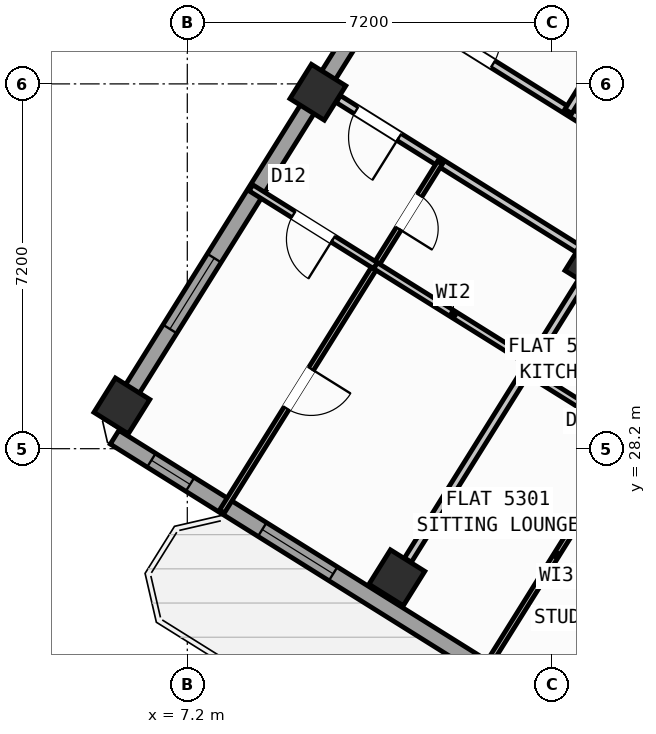
"""IFC4 building model, lengths in metres.
Left out: names, types, materials, properties, quantities, classifications, styles, units other than length and angle.
Written with IfcOpenShell. Run it as: python <this file> out.ifc"""

import sys

from ifc_helpers import new_model, si_unit, direction, frame, frame_2d, origin, origin_2d, place, context, subcontext, project, spatial, rectangle, hollow_rectangle, extrude, source, transform, mapped, element, fill, save


model = new_model("IFC4")
c1 = context("Model", 3, precision=1e-05, world=origin(), true_north=direction((0.0, 1.0)))
c2 = subcontext(c1, "Body", "Model", "MODEL_VIEW")
j1 = project(units=[si_unit("LENGTHUNIT", "METRE"), si_unit("PLANEANGLEUNIT", "RADIAN")], contexts=[c1])
p1 = place(None, origin())
s1 = spatial("IfcSite", under=j1, at=p1, CompositionType="ELEMENT")
p2 = place(p1, origin())
s2 = spatial("IfcBuilding", under=s1, at=p2, CompositionType="ELEMENT")
p3 = place(p2, frame((0.0, 0.0, 211.2)))
s3 = spatial("IfcBuildingStorey", under=s2, at=p3, CompositionType="ELEMENT", Elevation=211.2)
m1 = source(origin(), c2, "Body", "SweptSolid", [
    extrude(hollow_rectangle(XDim=0.8, YDim=0.8, WallThickness=0.032, at=origin_2d()), origin(), (0.0, 0.0, 1.0), 3.6),
])
for number, where, z_axis, x_axis in (
    (1, (15.205, 31.844, 0.0), (0.0, 0.0, 1.0), (-0.848, 0.53, 0.0)),
    (2, (11.336, 25.653, 0.0), (0.0, 0.0, 1.0), (-0.848, 0.53, 0.0)),
    (3, (9.777, 35.235, 0.0), (0.0, 0.0, 1.0), (-0.848, 0.53, 0.0)),
    (4, (5.909, 29.044, 0.0), (0.0, 0.0, 1.0), (-0.848, 0.53, 0.0)),
):
    element("IfcColumn", number, at=place(p3, frame(where, z_axis=z_axis, x_axis=x_axis)), inside=s3, PredefinedType="COLUMN", context=c2, shape_type="MappedRepresentation", body=[
        mapped(m1, transform((0.0, 0.0, 0.0), scale=1.0)),
    ])
p4 = place(p3, frame((31.76, 12.183, 0.0), z_axis=(0.0, 0.0, 1.0), x_axis=(-0.848047074256, 0.529920899612, 0.0)))
e5 = element("IfcWall", 5, at=p4, inside=s3, PredefinedType="STANDARD", context=c2, shape_type="SweptSolid", body=[
    extrude(rectangle(XDim=30.652, YDim=0.32, at=frame_2d((15.326, 0.0))), origin(), (0.0, 0.0, 1.0), 3.35),
])
p5 = place(p4, frame((15.166, 0.0, 0.0)))
e6 = element("IfcOpeningElement", 6, at=p5, cuts=e5, PredefinedType="OPENING", context=c2, shape_type="SweptSolid", body=[
    extrude(rectangle(XDim=1.2, YDim=2.15, at=frame_2d((0.6, 1.075))), frame((0.0, 0.17, 0.0), z_axis=(0.0, -1.0, 0.0), x_axis=(1.0, 0.0, 0.0)), (0.0, 0.0, 1.0), 0.34),
])
p6 = place(p4, frame((2.24, 0.0, 0.9)))
e7 = element("IfcOpeningElement", 7, at=p6, cuts=e5, PredefinedType="OPENING", context=c2, shape_type="SweptSolid", body=[
    extrude(rectangle(XDim=1.65, YDim=1.45, at=frame_2d((0.825, 0.725))), frame((0.0, 0.17, 0.0), z_axis=(0.0, -1.0, 0.0), x_axis=(1.0, 0.0, 0.0)), (0.0, 0.0, 1.0), 0.34),
])
p7 = place(p4, frame((7.469, 0.0, 0.9)))
e8 = element("IfcOpeningElement", 8, at=p7, cuts=e5, PredefinedType="OPENING", context=c2, shape_type="SweptSolid", body=[
    extrude(rectangle(XDim=1.65, YDim=1.45, at=frame_2d((0.825, 0.725))), frame((0.0, 0.17, 0.0), z_axis=(0.0, -1.0, 0.0), x_axis=(1.0, 0.0, 0.0)), (0.0, 0.0, 1.0), 0.34),
])
p8 = place(p4, frame((12.623, 0.0, 1.0)))
e9 = element("IfcOpeningElement", 9, at=p8, cuts=e5, PredefinedType="OPENING", context=c2, shape_type="SweptSolid", body=[
    extrude(rectangle(XDim=0.9, YDim=1.25, at=frame_2d((0.45, 0.625))), frame((0.0, 0.17, 0.0), z_axis=(0.0, -1.0, 0.0), x_axis=(1.0, 0.0, 0.0)), (0.0, 0.0, 1.0), 0.34),
])
p9 = place(p4, frame((19.715, 0.0, 1.0)))
e10 = element("IfcOpeningElement", 10, at=p9, cuts=e5, PredefinedType="OPENING", context=c2, shape_type="SweptSolid", body=[
    extrude(rectangle(XDim=0.9, YDim=1.25, at=frame_2d((0.45, 0.625))), frame((0.0, 0.17, 0.0), z_axis=(0.0, -1.0, 0.0), x_axis=(1.0, 0.0, 0.0)), (0.0, 0.0, 1.0), 0.34),
])
p10 = place(p4, frame((25.566, 0.0, 0.9)))
e11 = element("IfcOpeningElement", 11, at=p10, cuts=e5, PredefinedType="OPENING", context=c2, shape_type="SweptSolid", body=[
    extrude(rectangle(XDim=1.65, YDim=1.45, at=frame_2d((0.825, 0.725))), frame((0.0, 0.17, 0.0), z_axis=(0.0, -1.0, 0.0), x_axis=(1.0, 0.0, 0.0)), (0.0, 0.0, 1.0), 0.34),
])
p11 = place(p4, frame((28.896, 0.0, 1.0)))
e12 = element("IfcOpeningElement", 12, at=p11, cuts=e5, PredefinedType="OPENING", context=c2, shape_type="SweptSolid", body=[
    extrude(rectangle(XDim=0.9, YDim=1.25, at=frame_2d((0.45, 0.625))), frame((0.0, 0.17, 0.0), z_axis=(0.0, -1.0, 0.0), x_axis=(1.0, 0.0, 0.0)), (0.0, 0.0, 1.0), 0.34),
])
p12 = place(p3, frame((5.7, 28.71, 0.0), z_axis=(0.0, 0.0, 1.0), x_axis=(0.529923711467, 0.8480453172, 0.0)))
e13 = element("IfcWall", 13, at=p12, inside=s3, PredefinedType="STANDARD", context=c2, shape_type="SweptSolid", body=[
    extrude(rectangle(XDim=21.587, YDim=0.32, at=frame_2d((10.794, 0.0))), origin(), (0.0, 0.0, 1.0), 2.825),
])
p13 = place(p12, frame((2.184, 0.0, 0.9)))
e14 = element("IfcOpeningElement", 14, at=p13, cuts=e13, PredefinedType="OPENING", context=c2, shape_type="SweptSolid", body=[
    extrude(rectangle(XDim=1.65, YDim=1.45, at=frame_2d((0.825, 0.725))), frame((0.0, 0.17, 0.0), z_axis=(0.0, -1.0, 0.0), x_axis=(1.0, 0.0, 0.0)), (0.0, 0.0, 1.0), 0.34),
])
p14 = place(p12, frame((11.709, 0.0, 0.9)))
e15 = element("IfcOpeningElement", 15, at=p14, cuts=e13, PredefinedType="OPENING", context=c2, shape_type="SweptSolid", body=[
    extrude(rectangle(XDim=1.35, YDim=1.45, at=frame_2d((0.675, 0.725))), frame((0.0, 0.17, 0.0), z_axis=(0.0, -1.0, 0.0), x_axis=(1.0, 0.0, 0.0)), (0.0, 0.0, 1.0), 0.34),
])
p15 = place(p12, frame((17.181, 0.0, 0.95)))
e16 = element("IfcOpeningElement", 16, at=p15, cuts=e13, PredefinedType="OPENING", context=c2, shape_type="SweptSolid", body=[
    extrude(rectangle(XDim=1.95, YDim=1.35, at=frame_2d((0.975, 0.675))), frame((0.0, 0.17, 0.0), z_axis=(0.0, -1.0, 0.0), x_axis=(1.0, 0.0, 0.0)), (0.0, 0.0, 1.0), 0.34),
])
p16 = place(p3, frame((25.065, 28.394, 0.0), z_axis=(0.0, 0.0, 1.0), x_axis=(-0.848048310262, 0.529918921593, 0.0)))
e17 = element("IfcWall", 17, at=p16, inside=s3, PredefinedType="PARTITIONING", context=c2, shape_type="SweptSolid", body=[
    extrude(rectangle(XDim=16.73, YDim=0.16, at=frame_2d((8.365, 0.0))), origin(), (0.0, 0.0, 1.0), 3.34),
])
p17 = place(p16, frame((1.338, 0.0, 0.0)))
e18 = element("IfcOpeningElement", 18, at=p17, cuts=e17, PredefinedType="OPENING", context=c2, shape_type="SweptSolid", body=[
    extrude(rectangle(XDim=1.0, YDim=2.1, at=frame_2d((0.5, 1.05))), frame((0.0, 0.09, 0.0), z_axis=(0.0, -1.0, 0.0), x_axis=(1.0, 0.0, 0.0)), (0.0, 0.0, 1.0), 0.18),
])
p18 = place(p16, frame((5.265, 0.0, 0.0)))
e19 = element("IfcOpeningElement", 19, at=p18, cuts=e17, PredefinedType="OPENING", context=c2, shape_type="SweptSolid", body=[
    extrude(rectangle(XDim=1.0, YDim=2.1, at=frame_2d((0.5, 1.05))), frame((0.0, 0.09, 0.0), z_axis=(0.0, -1.0, 0.0), x_axis=(1.0, 0.0, 0.0)), (0.0, 0.0, 1.0), 0.18),
])
p19 = place(p16, frame((9.526, 0.0, 0.0)))
e20 = element("IfcOpeningElement", 20, at=p19, cuts=e17, PredefinedType="OPENING", context=c2, shape_type="SweptSolid", body=[
    extrude(rectangle(XDim=1.0, YDim=2.1, at=frame_2d((0.5, 1.05))), frame((0.0, 0.09, 0.0), z_axis=(0.0, -1.0, 0.0), x_axis=(1.0, 0.0, 0.0)), (0.0, 0.0, 1.0), 0.18),
])
p20 = place(p16, frame((13.954, 0.0, 0.0)))
e21 = element("IfcOpeningElement", 21, at=p20, cuts=e17, PredefinedType="OPENING", context=c2, shape_type="SweptSolid", body=[
    extrude(rectangle(XDim=1.0, YDim=2.1, at=frame_2d((0.5, 1.05))), frame((0.0, 0.09, 0.0), z_axis=(0.0, -1.0, 0.0), x_axis=(1.0, 0.0, 0.0)), (0.0, 0.0, 1.0), 0.18),
])
p21 = place(p3, frame((14.908, 32.147, 0.0), z_axis=(0.0, 0.0, 1.0), x_axis=(-0.848049955116, 0.529916289265, 0.0)))
e22 = element("IfcWall", 22, at=p21, inside=s3, PredefinedType="PARTITIONING", context=c2, shape_type="SweptSolid", body=[
    extrude(rectangle(XDim=5.576, YDim=0.16, at=frame_2d((2.788, 0.0))), origin(), (0.0, 0.0, 1.0), 2.825),
])
p22 = place(p21, frame((4.158, 0.0, 0.0)))
e23 = element("IfcOpeningElement", 23, at=p22, cuts=e22, PredefinedType="OPENING", context=c2, shape_type="SweptSolid", body=[
    extrude(rectangle(XDim=1.0, YDim=2.1, at=frame_2d((0.5, 1.05))), frame((0.0, 0.09, 0.0), z_axis=(0.0, -1.0, 0.0), x_axis=(1.0, 0.0, 0.0)), (0.0, 0.0, 1.0), 0.18),
])
p23 = place(p3, frame((14.986, 31.494, 0.0), z_axis=(0.0, 0.0, 1.0), x_axis=(-0.529907440938, -0.848055484057, 0.0)))
e24 = element("IfcWall", 24, at=p23, inside=s3, PredefinedType="PARTITIONING", context=c2, shape_type="SweptSolid", body=[
    extrude(rectangle(XDim=6.476, YDim=0.16, at=frame_2d((3.238, 0.0))), origin(), (0.0, 0.0, 1.0), 2.825),
])
p24 = place(p3, frame((19.318, 26.349, 0.0), z_axis=(0.0, 0.0, 1.0), x_axis=(-0.848039019877, 0.529933789039, 0.0)))
e25 = element("IfcWall", 25, at=p24, inside=s3, PredefinedType="PLUMBINGWALL", context=c2, shape_type="SweptSolid", body=[
    extrude(rectangle(XDim=6.4, YDim=0.14, at=frame_2d((3.2, 0.0))), origin(), (0.0, 0.0, 1.0), 3.34),
])
p25 = place(p24, frame((2.824, 0.0, 0.0)))
e26 = element("IfcOpeningElement", 26, at=p25, cuts=e25, PredefinedType="OPENING", context=c2, shape_type="SweptSolid", body=[
    extrude(rectangle(XDim=0.78, YDim=2.05, at=frame_2d((0.39, 1.025))), frame((0.0, 0.08, 0.0), z_axis=(0.0, -1.0, 0.0), x_axis=(1.0, 0.0, 0.0)), (0.0, 0.0, 1.0), 0.16),
])
p26 = place(p3, frame((15.953, 28.452, 0.0), z_axis=(0.0, 0.0, 1.0), x_axis=(-0.529919714018, -0.848047815099, 0.0)))
e27 = element("IfcWall", 27, at=p26, inside=s3, PredefinedType="PARTITIONING", context=c2, shape_type="SweptSolid", body=[
    extrude(rectangle(XDim=5.54, YDim=0.11, at=frame_2d((2.77, 0.0))), origin(), (0.0, 0.0, 1.0), 3.34),
])
p27 = place(p26, frame((0.35, 0.0, 0.0)))
e28 = element("IfcOpeningElement", 28, at=p27, cuts=e27, PredefinedType="OPENING", context=c2, shape_type="SweptSolid", body=[
    extrude(rectangle(XDim=0.92, YDim=2.08, at=frame_2d((0.46, 1.04))), frame((0.0, 0.065, 0.0), z_axis=(0.0, -1.0, 0.0), x_axis=(1.0, 0.0, 0.0)), (0.0, 0.0, 1.0), 0.13),
])
p28 = place(p3, frame((12.188, 33.847, 0.0), z_axis=(0.0, 0.0, 1.0), x_axis=(-0.529917860021, -0.848048973604, 0.0)))
e29 = element("IfcWall", 29, at=p28, inside=s3, PredefinedType="PARTITIONING", context=c2, shape_type="SweptSolid", body=[
    extrude(rectangle(XDim=8.12, YDim=0.11, at=frame_2d((4.06, 0.0))), origin(), (0.0, 0.0, 1.0), 3.34),
])
p29 = place(p28, frame((0.76, 0.0, 0.0)))
e30 = element("IfcOpeningElement", 30, at=p29, cuts=e29, PredefinedType="OPENING", context=c2, shape_type="SweptSolid", body=[
    extrude(rectangle(XDim=0.78, YDim=2.05, at=frame_2d((0.39, 1.025))), frame((0.0, 0.065, 0.0), z_axis=(0.0, -1.0, 0.0), x_axis=(1.0, 0.0, 0.0)), (0.0, 0.0, 1.0), 0.13),
])
p30 = place(p28, frame((4.8, 0.0, 0.0)))
e31 = element("IfcOpeningElement", 31, at=p30, cuts=e29, PredefinedType="OPENING", context=c2, shape_type="SweptSolid", body=[
    extrude(rectangle(XDim=0.92, YDim=2.08, at=frame_2d((0.46, 1.04))), frame((0.0, 0.065, 0.0), z_axis=(0.0, -1.0, 0.0), x_axis=(1.0, 0.0, 0.0)), (0.0, 0.0, 1.0), 0.13),
])
p31 = place(p3, frame((10.916, 31.811, 0.0), z_axis=(0.0, 0.0, 1.0), x_axis=(-0.84802195137, 0.529961102341, 0.0)))
e32 = element("IfcWall", 32, at=p31, inside=s3, PredefinedType="PLUMBINGWALL", context=c2, shape_type="SweptSolid", body=[
    extrude(rectangle(XDim=2.9, YDim=0.14, at=frame_2d((1.45, 0.0))), origin(), (0.0, 0.0, 1.0), 3.34),
])
p32 = place(p31, frame((0.99, 0.0, 0.0)))
e33 = element("IfcOpeningElement", 33, at=p32, cuts=e32, PredefinedType="OPENING", context=c2, shape_type="SweptSolid", body=[
    extrude(rectangle(XDim=0.92, YDim=2.08, at=frame_2d((0.46, 1.04))), frame((0.0, 0.08, 0.0), z_axis=(0.0, -1.0, 0.0), x_axis=(1.0, 0.0, 0.0)), (0.0, 0.0, 1.0), 0.16),
])
p33 = place(p3, frame((13.986, 29.893, 0.0), z_axis=(0.0, 0.0, 1.0), x_axis=(-0.848051346257, 0.52991406295, 0.0)))
e34 = element("IfcWall", 34, at=p33, inside=s3, PredefinedType="PLUMBINGWALL", context=c2, shape_type="SweptSolid", body=[
    extrude(rectangle(XDim=3.62, YDim=0.14, at=frame_2d((1.81, 0.0))), origin(), (0.0, 0.0, 1.0), 3.34),
])
p34 = place(p3, frame((20.894, 44.738, 0.0), z_axis=(0.0, 0.0, 1.0), x_axis=(-0.529916055051, -0.848050101468, 0.0)))
e35 = element("IfcWall", 35, at=p34, inside=s3, PredefinedType="PARTITIONING", context=c2, shape_type="SweptSolid", body=[
    extrude(rectangle(XDim=11.65, YDim=0.16, at=frame_2d((5.825, 0.0))), origin(), (0.0, 0.0, 1.0), 2.995),
])
m2 = source(origin(), c2, "Body", "SweptSolid", [
    extrude(rectangle(XDim=1.65, YDim=1.45, at=frame_2d((0.825, 0.725))), frame((0.0, 0.03, 0.0), z_axis=(0.0, -1.0, 0.0), x_axis=(1.0, 0.0, 0.0)), (0.0, 0.0, 1.0), 0.06),
])
p35 = place(p10, origin())
e36 = element("IfcWindow", 36, at=p35, inside=s3, PartitioningType="SINGLE_PANEL", PredefinedType="WINDOW", context=c2, shape_type="MappedRepresentation", body=[
    mapped(m2, transform((0.0, 0.0, 0.0), scale=1.0)),
])
fill(e11, e36)
m3 = source(origin(), c2, "Body", "SweptSolid", [
    extrude(rectangle(XDim=0.9, YDim=1.25, at=frame_2d((0.45, 0.625))), frame((0.0, 0.03, 0.0), z_axis=(0.0, -1.0, 0.0), x_axis=(1.0, 0.0, 0.0)), (0.0, 0.0, 1.0), 0.06),
])
p36 = place(p11, origin())
e37 = element("IfcWindow", 37, at=p36, inside=s3, PartitioningType="SINGLE_PANEL", PredefinedType="WINDOW", context=c2, shape_type="MappedRepresentation", body=[
    mapped(m3, transform((0.0, 0.0, 0.0), scale=1.0)),
])
fill(e12, e37)
p37 = place(p13, origin())
e38 = element("IfcWindow", 38, at=p37, inside=s3, PartitioningType="SINGLE_PANEL", PredefinedType="WINDOW", context=c2, shape_type="MappedRepresentation", body=[
    mapped(m2, transform((0.0, 0.0, 0.0), scale=1.0)),
])
fill(e14, e38)
m4 = source(origin(), c2, "Body", "SweptSolid", [
    extrude(rectangle(XDim=1.0, YDim=2.1, at=frame_2d((0.5, 1.05))), frame((0.0, 0.025, 0.0), z_axis=(0.0, -1.0, 0.0), x_axis=(1.0, 0.0, 0.0)), (0.0, 0.0, 1.0), 0.05),
])
p38 = place(p22, origin())
e39 = element("IfcDoor", 39, at=p38, inside=s3, OperationType="SINGLE_SWING_LEFT", PredefinedType="DOOR", context=c2, shape_type="MappedRepresentation", body=[
    mapped(m4, transform((0.0, 0.0, 0.0), scale=1.0)),
])
fill(e23, e39)
m5 = source(origin(), c2, "Body", "SweptSolid", [
    extrude(rectangle(XDim=0.92, YDim=2.08, at=frame_2d((0.46, 1.04))), frame((0.0, 0.025, 0.0), z_axis=(0.0, -1.0, 0.0), x_axis=(1.0, 0.0, 0.0)), (0.0, 0.0, 1.0), 0.05),
])
p39 = place(p32, origin())
e40 = element("IfcDoor", 40, at=p39, inside=s3, OperationType="SINGLE_SWING_LEFT", PredefinedType="DOOR", context=c2, shape_type="MappedRepresentation", body=[
    mapped(m5, transform((0.0, 0.0, 0.0), scale=1.0)),
])
fill(e33, e40)
m6 = source(origin(), c2, "Body", "SweptSolid", [
    extrude(rectangle(XDim=0.78, YDim=2.05, at=frame_2d((0.39, 1.025))), frame((0.0, 0.025, 0.0), z_axis=(0.0, -1.0, 0.0), x_axis=(1.0, 0.0, 0.0)), (0.0, 0.0, 1.0), 0.05),
])
p40 = place(p29, origin())
e41 = element("IfcDoor", 41, at=p40, inside=s3, OperationType="SINGLE_SWING_RIGHT", PredefinedType="DOOR", context=c2, shape_type="MappedRepresentation", body=[
    mapped(m6, transform((0.0, 0.0, 0.0), scale=1.0)),
])
fill(e30, e41)
p41 = place(p30, origin())
e42 = element("IfcDoor", 42, at=p41, inside=s3, OperationType="SINGLE_SWING_LEFT", PredefinedType="DOOR", context=c2, shape_type="MappedRepresentation", body=[
    mapped(m5, transform((0.0, 0.0, 0.0), scale=1.0)),
])
fill(e31, e42)
p42 = place(p20, frame((1.0, 0.0, 0.0), z_axis=(0.0, 0.0, 1.0), x_axis=(-1.0, 0.0, 0.0)))
e43 = element("IfcDoor", 43, at=p42, inside=s3, OperationType="SINGLE_SWING_LEFT", PredefinedType="DOOR", context=c2, shape_type="MappedRepresentation", body=[
    mapped(m4, transform((0.0, 0.0, 0.0), scale=1.0)),
])
fill(e21, e43)
save(model, sys.argv[1])
